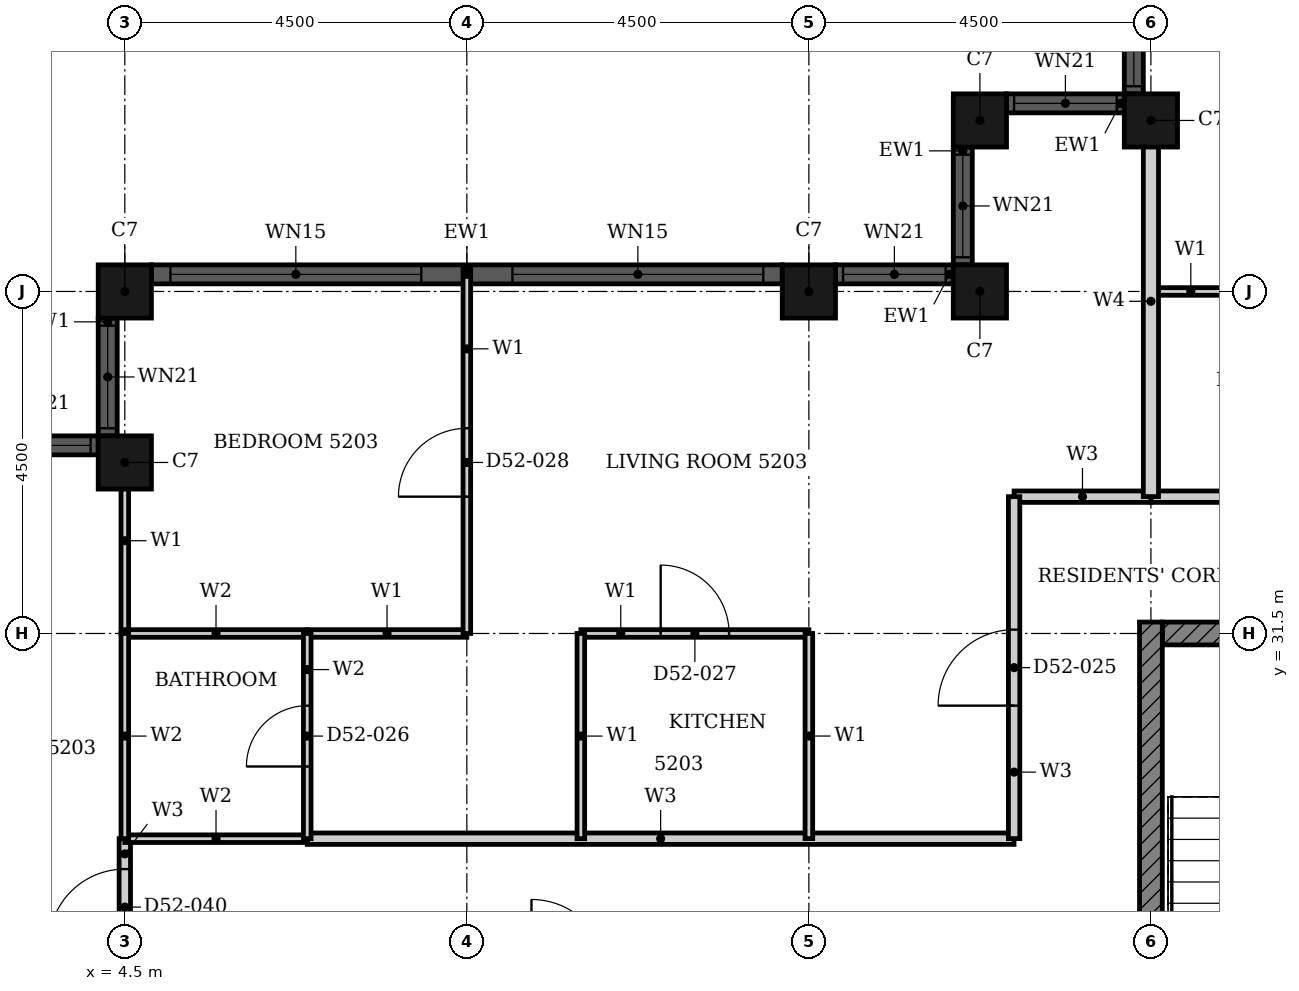
"""IFC4 building model, lengths in metres.
Left out: names, types, materials, properties, quantities, classifications, styles, units other than length and angle.
Written with IfcOpenShell. Run it as: python <this file> out.ifc"""

import sys

from ifc_helpers import new_model, si_unit, direction, frame, frame_2d, origin, origin_2d, place, context, subcontext, project, spatial, rectangle, hollow_rectangle, extrude, element, fill, save


model = new_model("IFC4")
c1 = context("Model", 3, precision=1e-05, world=origin(), true_north=direction((0.0, 1.0)))
c2 = subcontext(c1, "Body", "Model", "MODEL_VIEW")
j1 = project(units=[si_unit("LENGTHUNIT", "METRE"), si_unit("PLANEANGLEUNIT", "RADIAN")], contexts=[c1])
p1 = place(None, origin())
s1 = spatial("IfcSite", under=j1, at=p1, CompositionType="ELEMENT")
p2 = place(p1, origin())
s2 = spatial("IfcBuilding", under=s1, at=p2, CompositionType="ELEMENT")
p3 = place(p2, frame((0.0, 0.0, 207.2)))
s3 = spatial("IfcBuildingStorey", under=s2, at=p3, CompositionType="ELEMENT", Elevation=207.2)
for number, where, z_axis, x_axis in (
    (1, (18.0, 38.25, 0.0), (0.0, 0.0, 1.0), (1.0, 0.0, 0.0)),
    (2, (15.75, 38.25, 0.0), (0.0, 0.0, 1.0), (1.0, 0.0, 0.0)),
    (3, (15.75, 36.0, 0.0), (0.0, 0.0, 1.0), (1.0, 0.0, 0.0)),
    (4, (13.5, 36.0, 0.0), (0.0, 0.0, 1.0), (1.0, 0.0, 0.0)),
    (5, (4.5, 36.0, 0.0), (0.0, 0.0, 1.0), (1.0, 0.0, 0.0)),
    (6, (4.5, 33.75, 0.0), (0.0, 0.0, 1.0), (1.0, 0.0, 0.0)),
):
    element("IfcColumn", number, at=place(p3, frame(where, z_axis=z_axis, x_axis=x_axis)), inside=s3, PredefinedType="COLUMN", context=c2, shape_type="SweptSolid", body=[
        extrude(hollow_rectangle(XDim=0.7, YDim=0.7, WallThickness=0.022, at=origin_2d()), origin(), (0.0, 0.0, 1.0), 3.7),
    ])
p4 = place(p3, frame((17.775, 40.15, 0.0), z_axis=(0.0, 0.0, 1.0), x_axis=(0.0, -1.0, 0.0)))
e7 = element("IfcWall", 7, at=p4, inside=s3, PredefinedType="SOLIDWALL", context=c2, shape_type="SweptSolid", body=[
    extrude(rectangle(XDim=1.55, YDim=0.25, at=frame_2d((0.775, 0.0))), origin(), (0.0, 0.0, 1.0), 3.7),
])
p5 = place(p4, frame((0.1, 0.0, 0.9)))
e8 = element("IfcOpeningElement", 8, at=p5, cuts=e7, PredefinedType="OPENING", context=c2, shape_type="SweptSolid", body=[
    extrude(rectangle(XDim=1.35, YDim=1.85, at=frame_2d((0.675, 0.925))), frame((0.0, 0.135, 0.0), z_axis=(0.0, -1.0, 0.0), x_axis=(1.0, 0.0, 0.0)), (0.0, 0.0, 1.0), 0.27),
])
p6 = place(p3, frame((17.65, 38.475, 0.0), z_axis=(0.0, 0.0, 1.0), x_axis=(-1.0, 0.0, 0.0)))
e9 = element("IfcWall", 9, at=p6, inside=s3, PredefinedType="SOLIDWALL", context=c2, shape_type="SweptSolid", body=[
    extrude(rectangle(XDim=1.55, YDim=0.25, at=frame_2d((0.775, 0.0))), origin(), (0.0, 0.0, 1.0), 3.7),
])
p7 = place(p6, frame((0.1, 0.0, 0.9)))
e10 = element("IfcOpeningElement", 10, at=p7, cuts=e9, PredefinedType="OPENING", context=c2, shape_type="SweptSolid", body=[
    extrude(rectangle(XDim=1.35, YDim=1.85, at=frame_2d((0.675, 0.925))), frame((0.0, 0.135, 0.0), z_axis=(0.0, -1.0, 0.0), x_axis=(1.0, 0.0, 0.0)), (0.0, 0.0, 1.0), 0.27),
])
p8 = place(p3, frame((15.525, 37.9, 0.0), z_axis=(0.0, 0.0, 1.0), x_axis=(0.0, -1.0, 0.0)))
e11 = element("IfcWall", 11, at=p8, inside=s3, PredefinedType="SOLIDWALL", context=c2, shape_type="SweptSolid", body=[
    extrude(rectangle(XDim=1.55, YDim=0.25, at=frame_2d((0.775, 0.0))), origin(), (0.0, 0.0, 1.0), 3.7),
])
p9 = place(p8, frame((0.1, 0.0, 0.9)))
e12 = element("IfcOpeningElement", 12, at=p9, cuts=e11, PredefinedType="OPENING", context=c2, shape_type="SweptSolid", body=[
    extrude(rectangle(XDim=1.35, YDim=1.85, at=frame_2d((0.675, 0.925))), frame((0.0, 0.135, 0.0), z_axis=(0.0, -1.0, 0.0), x_axis=(1.0, 0.0, 0.0)), (0.0, 0.0, 1.0), 0.27),
])
p10 = place(p3, frame((15.4, 36.225, 0.0), z_axis=(0.0, 0.0, 1.0), x_axis=(-1.0, 0.0, 0.0)))
e13 = element("IfcWall", 13, at=p10, inside=s3, PredefinedType="SOLIDWALL", context=c2, shape_type="SweptSolid", body=[
    extrude(rectangle(XDim=1.55, YDim=0.25, at=frame_2d((0.775, 0.0))), origin(), (0.0, 0.0, 1.0), 3.7),
])
p11 = place(p10, frame((0.1, 0.0, 0.9)))
e14 = element("IfcOpeningElement", 14, at=p11, cuts=e13, PredefinedType="OPENING", context=c2, shape_type="SweptSolid", body=[
    extrude(rectangle(XDim=1.35, YDim=1.85, at=frame_2d((0.675, 0.925))), frame((0.0, 0.135, 0.0), z_axis=(0.0, -1.0, 0.0), x_axis=(1.0, 0.0, 0.0)), (0.0, 0.0, 1.0), 0.27),
])
p12 = place(p3, frame((13.15, 36.225, 0.0), z_axis=(0.0, 0.0, 1.0), x_axis=(-1.0, 0.0, 0.0)))
e15 = element("IfcWall", 15, at=p12, inside=s3, PredefinedType="SOLIDWALL", context=c2, shape_type="SweptSolid", body=[
    extrude(rectangle(XDim=8.3, YDim=0.25, at=frame_2d((4.15, 0.0))), origin(), (0.0, 0.0, 1.0), 3.7),
])
p13 = place(p12, frame((0.25, 0.0, 0.45)))
e16 = element("IfcOpeningElement", 16, at=p13, cuts=e15, PredefinedType="OPENING", context=c2, shape_type="SweptSolid", body=[
    extrude(rectangle(XDim=3.3, YDim=2.3, at=frame_2d((1.65, 1.15))), frame((0.0, 0.135, 0.0), z_axis=(0.0, -1.0, 0.0), x_axis=(1.0, 0.0, 0.0)), (0.0, 0.0, 1.0), 0.27),
])
p14 = place(p12, frame((4.75, 0.0, 0.45)))
e17 = element("IfcOpeningElement", 17, at=p14, cuts=e15, PredefinedType="OPENING", context=c2, shape_type="SweptSolid", body=[
    extrude(rectangle(XDim=3.3, YDim=2.3, at=frame_2d((1.65, 1.15))), frame((0.0, 0.135, 0.0), z_axis=(0.0, -1.0, 0.0), x_axis=(1.0, 0.0, 0.0)), (0.0, 0.0, 1.0), 0.27),
])
p15 = place(p3, frame((4.275, 35.65, 0.0), z_axis=(0.0, 0.0, 1.0), x_axis=(0.0, -1.0, 0.0)))
e18 = element("IfcWall", 18, at=p15, inside=s3, PredefinedType="SOLIDWALL", context=c2, shape_type="SweptSolid", body=[
    extrude(rectangle(XDim=1.55, YDim=0.25, at=frame_2d((0.775, 0.0))), origin(), (0.0, 0.0, 1.0), 3.7),
])
p16 = place(p15, frame((0.1, 0.0, 0.9)))
e19 = element("IfcOpeningElement", 19, at=p16, cuts=e18, PredefinedType="OPENING", context=c2, shape_type="SweptSolid", body=[
    extrude(rectangle(XDim=1.35, YDim=1.85, at=frame_2d((0.675, 0.925))), frame((0.0, 0.135, 0.0), z_axis=(0.0, -1.0, 0.0), x_axis=(1.0, 0.0, 0.0)), (0.0, 0.0, 1.0), 0.27),
])
p17 = place(p3, frame((4.15, 33.975, 0.0), z_axis=(0.0, 0.0, 1.0), x_axis=(-1.0, 0.0, 0.0)))
e20 = element("IfcWall", 20, at=p17, inside=s3, PredefinedType="SOLIDWALL", context=c2, shape_type="SweptSolid", body=[
    extrude(rectangle(XDim=1.55, YDim=0.25, at=frame_2d((0.775, 0.0))), origin(), (0.0, 0.0, 1.0), 3.7),
])
p18 = place(p17, frame((0.1, 0.0, 0.9)))
e21 = element("IfcOpeningElement", 21, at=p18, cuts=e20, PredefinedType="OPENING", context=c2, shape_type="SweptSolid", body=[
    extrude(rectangle(XDim=1.35, YDim=1.85, at=frame_2d((0.675, 0.925))), frame((0.0, 0.135, 0.0), z_axis=(0.0, -1.0, 0.0), x_axis=(1.0, 0.0, 0.0)), (0.0, 0.0, 1.0), 0.27),
])
p19 = place(p3, frame((18.15, 31.5, 0.0), z_axis=(0.0, 0.0, 1.0), x_axis=(1.0, 0.0, 0.0)))
e22 = element("IfcWall", 22, at=p19, inside=s3, PredefinedType="SHEAR", context=c2, shape_type="SweptSolid", body=[
    extrude(rectangle(XDim=9.368, YDim=0.3, at=frame_2d((4.684, 0.0))), origin(), (0.0, 0.0, 1.0), 3.4),
])
p20 = place(p19, frame((4.736, 0.0, 0.0)))
e23 = element("IfcOpeningElement", 23, at=p20, cuts=e22, PredefinedType="OPENING", context=c2, shape_type="SweptSolid", body=[
    extrude(rectangle(XDim=1.8, YDim=2.1, at=frame_2d((0.9, 1.05))), frame((0.0, 0.16, 0.0), z_axis=(0.0, -1.0, 0.0), x_axis=(1.0, 0.0, 0.0)), (0.0, 0.0, 1.0), 0.32),
])
p21 = place(p3, frame((18.0, 22.35, 0.0), z_axis=(0.0, 0.0, 1.0), x_axis=(0.0, 1.0, 0.0)))
e24 = element("IfcWall", 24, at=p21, inside=s3, PredefinedType="SHEAR", context=c2, shape_type="SweptSolid", body=[
    extrude(rectangle(XDim=9.3, YDim=0.3, at=frame_2d((4.65, 0.0))), origin(), (0.0, 0.0, 1.0), 3.4),
])
p22 = place(p3, frame((6.9, 28.8, 0.0), z_axis=(0.0, 0.0, 1.0), x_axis=(1.0, 0.0, 0.0)))
e25 = element("IfcWall", 25, at=p22, inside=s3, PredefinedType="PARTITIONING", context=c2, shape_type="SweptSolid", body=[
    extrude(rectangle(XDim=9.299, YDim=0.15, at=frame_2d((4.649, 0.0))), origin(), (0.0, 0.0, 1.0), 3.4),
])
p23 = place(p3, frame((18.0, 33.3, 0.0), z_axis=(0.0, 0.0, 1.0), x_axis=(1.0, 0.0, 0.0)))
e26 = element("IfcWall", 26, at=p23, inside=s3, PredefinedType="PARTITIONING", context=c2, shape_type="SweptSolid", body=[
    extrude(rectangle(XDim=6.6, YDim=0.15, at=frame_2d((3.3, 0.0))), origin(), (0.0, 0.0, 1.0), 3.4),
])
p24 = place(p23, frame((4.3, 0.0, 0.0)))
e27 = element("IfcOpeningElement", 27, at=p24, cuts=e26, PredefinedType="OPENING", context=c2, shape_type="SweptSolid", body=[
    extrude(rectangle(XDim=1.0, YDim=2.2, at=frame_2d((0.5, 1.1))), frame((0.0, 0.085, 0.0), z_axis=(0.0, -1.0, 0.0), x_axis=(1.0, 0.0, 0.0)), (0.0, 0.0, 1.0), 0.17),
])
p25 = place(p3, frame((16.2, 33.3, 0.0), z_axis=(0.0, 0.0, 1.0), x_axis=(1.0, 0.0, 0.0)))
e28 = element("IfcWall", 28, at=p25, inside=s3, PredefinedType="PARTITIONING", context=c2, shape_type="SweptSolid", body=[
    extrude(rectangle(XDim=1.799, YDim=0.15, at=frame_2d((0.899, 0.0))), origin(), (0.0, 0.0, 1.0), 3.4),
])
p26 = place(p3, frame((16.2, 28.801, 0.0), z_axis=(0.0, 0.0, 1.0), x_axis=(0.0, 1.0, 0.0)))
e29 = element("IfcWall", 29, at=p26, inside=s3, PredefinedType="PARTITIONING", context=c2, shape_type="SweptSolid", body=[
    extrude(rectangle(XDim=4.499, YDim=0.15, at=frame_2d((2.25, 0.0))), origin(), (0.0, 0.0, 1.0), 3.4),
])
p27 = place(p26, frame((1.75, 0.0, 0.0)))
e30 = element("IfcOpeningElement", 30, at=p27, cuts=e29, PredefinedType="OPENING", context=c2, shape_type="SweptSolid", body=[
    extrude(rectangle(XDim=1.0, YDim=2.2, at=frame_2d((0.5, 1.1))), frame((0.0, 0.085, 0.0), z_axis=(0.0, -1.0, 0.0), x_axis=(1.0, 0.0, 0.0)), (0.0, 0.0, 1.0), 0.17),
])
p28 = place(p3, frame((4.5, 27.0, 0.0), z_axis=(0.0, 0.0, 1.0), x_axis=(0.0, 1.0, 0.0)))
e31 = element("IfcWall", 31, at=p28, inside=s3, PredefinedType="PARTITIONING", context=c2, shape_type="SweptSolid", body=[
    extrude(rectangle(XDim=1.8, YDim=0.15, at=frame_2d((0.9, 0.0))), origin(), (0.0, 0.0, 1.0), 3.4),
])
p29 = place(p28, frame((0.4, 0.0, 0.0)))
e32 = element("IfcOpeningElement", 32, at=p29, cuts=e31, PredefinedType="OPENING", context=c2, shape_type="SweptSolid", body=[
    extrude(rectangle(XDim=1.0, YDim=2.1, at=frame_2d((0.5, 1.05))), frame((0.0, 0.085, 0.0), z_axis=(0.0, -1.0, 0.0), x_axis=(1.0, 0.0, 0.0)), (0.0, 0.0, 1.0), 0.17),
])
p30 = place(p3, frame((6.9, 31.5, 0.0), z_axis=(0.0, 0.0, 1.0), x_axis=(1.0, 0.0, 0.0)))
e33 = element("IfcWall", 33, at=p30, inside=s3, PredefinedType="PARTITIONING", context=c2, shape_type="SweptSolid", body=[
    extrude(rectangle(XDim=2.1, YDim=0.1, at=frame_2d((1.05, 0.0))), origin(), (0.0, 0.0, 1.0), 2.68),
])
p31 = place(p3, frame((10.5, 31.5, 0.0), z_axis=(0.0, 0.0, 1.0), x_axis=(1.0, 0.0, 0.0)))
e34 = element("IfcWall", 34, at=p31, inside=s3, PredefinedType="PARTITIONING", context=c2, shape_type="SweptSolid", body=[
    extrude(rectangle(XDim=3.0, YDim=0.1, at=frame_2d((1.5, 0.0))), origin(), (0.0, 0.0, 1.0), 2.68),
])
p32 = place(p31, frame((1.05, 0.0, 0.0)))
e35 = element("IfcOpeningElement", 35, at=p32, cuts=e34, PredefinedType="OPENING", context=c2, shape_type="SweptSolid", body=[
    extrude(rectangle(XDim=0.9, YDim=2.1, at=frame_2d((0.45, 1.05))), frame((0.0, 0.06, 0.0), z_axis=(0.0, -1.0, 0.0), x_axis=(1.0, 0.0, 0.0)), (0.0, 0.0, 1.0), 0.12),
])
p33 = place(p3, frame((18.0, 36.0, 0.0), z_axis=(0.0, 0.0, 1.0), x_axis=(1.0, 0.0, 0.0)))
e36 = element("IfcWall", 36, at=p33, inside=s3, PredefinedType="PARTITIONING", context=c2, shape_type="SweptSolid", body=[
    extrude(rectangle(XDim=3.0, YDim=0.1, at=frame_2d((1.5, 0.0))), origin(), (0.0, 0.0, 1.0), 3.4),
])
p34 = place(p33, frame((1.05, 0.0, 0.0)))
e37 = element("IfcOpeningElement", 37, at=p34, cuts=e36, PredefinedType="OPENING", context=c2, shape_type="SweptSolid", body=[
    extrude(rectangle(XDim=0.9, YDim=2.1, at=frame_2d((0.45, 1.05))), frame((0.0, 0.06, 0.0), z_axis=(0.0, -1.0, 0.0), x_axis=(1.0, 0.0, 0.0)), (0.0, 0.0, 1.0), 0.12),
])
p35 = place(p3, frame((10.5, 28.8, 0.0), z_axis=(0.0, 0.0, 1.0), x_axis=(0.0, 1.0, 0.0)))
e38 = element("IfcWall", 38, at=p35, inside=s3, PredefinedType="PARTITIONING", context=c2, shape_type="SweptSolid", body=[
    extrude(rectangle(XDim=2.7, YDim=0.1, at=frame_2d((1.35, 0.0))), origin(), (0.0, 0.0, 1.0), 3.4),
])
p36 = place(p3, frame((13.5, 28.801, 0.0), z_axis=(0.0, 0.0, 1.0), x_axis=(0.0, 1.0, 0.0)))
e39 = element("IfcWall", 39, at=p36, inside=s3, PredefinedType="PARTITIONING", context=c2, shape_type="SweptSolid", body=[
    extrude(rectangle(XDim=2.699, YDim=0.1, at=frame_2d((1.35, 0.0))), origin(), (0.0, 0.0, 1.0), 2.48),
])
p37 = place(p3, frame((4.5, 31.501, 0.0), z_axis=(0.0, 0.0, 1.0), x_axis=(0.0, 1.0, 0.0)))
e40 = element("IfcWall", 40, at=p37, inside=s3, PredefinedType="PARTITIONING", context=c2, shape_type="SweptSolid", body=[
    extrude(rectangle(XDim=2.439, YDim=0.1, at=frame_2d((1.219, 0.0))), origin(), (0.0, 0.0, 1.0), 3.4),
])
p38 = place(p3, frame((9.0, 31.5, 0.0), z_axis=(0.0, 0.0, 1.0), x_axis=(0.0, 1.0, 0.0)))
e41 = element("IfcWall", 41, at=p38, inside=s3, PredefinedType="PARTITIONING", context=c2, shape_type="SweptSolid", body=[
    extrude(rectangle(XDim=4.79, YDim=0.1, at=frame_2d((2.395, 0.0))), origin(), (0.0, 0.0, 1.0), 3.4),
])
p39 = place(p38, frame((1.8, 0.0, 0.0)))
e42 = element("IfcOpeningElement", 42, at=p39, cuts=e41, PredefinedType="OPENING", context=c2, shape_type="SweptSolid", body=[
    extrude(rectangle(XDim=0.9, YDim=2.1, at=frame_2d((0.45, 1.05))), frame((0.0, 0.06, 0.0), z_axis=(0.0, -1.0, 0.0), x_axis=(1.0, 0.0, 0.0)), (0.0, 0.0, 1.0), 0.12),
])
p40 = place(p3, frame((18.0, 33.301, 0.0), z_axis=(0.0, 0.0, 1.0), x_axis=(0.0, 1.0, 0.0)))
e43 = element("IfcWall", 43, at=p40, inside=s3, PredefinedType="PARTITIONING", context=c2, shape_type="SweptSolid", body=[
    extrude(rectangle(XDim=5.139, YDim=0.2, at=frame_2d((2.569, 0.0))), origin(), (0.0, 0.0, 1.0), 3.4),
])
p41 = place(p3, frame((4.5, 28.8, 0.0), z_axis=(0.0, 0.0, 1.0), x_axis=(1.0, 0.0, 0.0)))
e44 = element("IfcWall", 44, at=p41, inside=s3, PredefinedType="PARTITIONING", context=c2, shape_type="SweptSolid", body=[
    extrude(rectangle(XDim=2.4, YDim=0.1, at=frame_2d((1.2, 0.0))), origin(), (0.0, 0.0, 1.0), 3.4),
])
p42 = place(p3, frame((4.5, 31.5, 0.0), z_axis=(0.0, 0.0, 1.0), x_axis=(1.0, 0.0, 0.0)))
e45 = element("IfcWall", 45, at=p42, inside=s3, PredefinedType="PARTITIONING", context=c2, shape_type="SweptSolid", body=[
    extrude(rectangle(XDim=2.4, YDim=0.1, at=frame_2d((1.2, 0.0))), origin(), (0.0, 0.0, 1.0), 2.68),
])
p43 = place(p3, frame((4.5, 28.8, 0.0), z_axis=(0.0, 0.0, 1.0), x_axis=(0.0, 1.0, 0.0)))
e46 = element("IfcWall", 46, at=p43, inside=s3, PredefinedType="PARTITIONING", context=c2, shape_type="SweptSolid", body=[
    extrude(rectangle(XDim=2.7, YDim=0.1, at=frame_2d((1.35, 0.0))), origin(), (0.0, 0.0, 1.0), 3.4),
])
p44 = place(p3, frame((6.9, 28.8, 0.0), z_axis=(0.0, 0.0, 1.0), x_axis=(0.0, 1.0, 0.0)))
e47 = element("IfcWall", 47, at=p44, inside=s3, PredefinedType="PARTITIONING", context=c2, shape_type="SweptSolid", body=[
    extrude(rectangle(XDim=2.7, YDim=0.1, at=frame_2d((1.35, 0.0))), origin(), (0.0, 0.0, 1.0), 3.4),
])
p45 = place(p44, frame((0.95, 0.0, 0.0)))
e48 = element("IfcOpeningElement", 48, at=p45, cuts=e47, PredefinedType="OPENING", context=c2, shape_type="SweptSolid", body=[
    extrude(rectangle(XDim=0.8, YDim=2.1, at=frame_2d((0.4, 1.05))), frame((0.0, 0.06, 0.0), z_axis=(0.0, -1.0, 0.0), x_axis=(1.0, 0.0, 0.0)), (0.0, 0.0, 1.0), 0.12),
])
p46 = place(p5, origin())
e49 = element("IfcWindow", 49, at=p46, inside=s3, PartitioningType="SINGLE_PANEL", PredefinedType="WINDOW", context=c2, shape_type="SweptSolid", body=[
    extrude(rectangle(XDim=1.35, YDim=1.85, at=frame_2d((0.675, 0.925))), frame((0.0, 0.03, 0.0), z_axis=(0.0, -1.0, 0.0), x_axis=(1.0, 0.0, 0.0)), (0.0, 0.0, 1.0), 0.06),
])
fill(e8, e49)
p47 = place(p7, origin())
e50 = element("IfcWindow", 50, at=p47, inside=s3, PartitioningType="SINGLE_PANEL", PredefinedType="WINDOW", context=c2, shape_type="SweptSolid", body=[
    extrude(rectangle(XDim=1.35, YDim=1.85, at=frame_2d((0.675, 0.925))), frame((0.0, 0.03, 0.0), z_axis=(0.0, -1.0, 0.0), x_axis=(1.0, 0.0, 0.0)), (0.0, 0.0, 1.0), 0.06),
])
fill(e10, e50)
p48 = place(p9, origin())
e51 = element("IfcWindow", 51, at=p48, inside=s3, PartitioningType="SINGLE_PANEL", PredefinedType="WINDOW", context=c2, shape_type="SweptSolid", body=[
    extrude(rectangle(XDim=1.35, YDim=1.85, at=frame_2d((0.675, 0.925))), frame((0.0, 0.03, 0.0), z_axis=(0.0, -1.0, 0.0), x_axis=(1.0, 0.0, 0.0)), (0.0, 0.0, 1.0), 0.06),
])
fill(e12, e51)
p49 = place(p11, origin())
e52 = element("IfcWindow", 52, at=p49, inside=s3, PartitioningType="SINGLE_PANEL", PredefinedType="WINDOW", context=c2, shape_type="SweptSolid", body=[
    extrude(rectangle(XDim=1.35, YDim=1.85, at=frame_2d((0.675, 0.925))), frame((0.0, 0.03, 0.0), z_axis=(0.0, -1.0, 0.0), x_axis=(1.0, 0.0, 0.0)), (0.0, 0.0, 1.0), 0.06),
])
fill(e14, e52)
p50 = place(p13, origin())
e53 = element("IfcWindow", 53, at=p50, inside=s3, PartitioningType="SINGLE_PANEL", PredefinedType="WINDOW", context=c2, shape_type="SweptSolid", body=[
    extrude(rectangle(XDim=3.3, YDim=2.3, at=frame_2d((1.65, 1.15))), frame((0.0, 0.03, 0.0), z_axis=(0.0, -1.0, 0.0), x_axis=(1.0, 0.0, 0.0)), (0.0, 0.0, 1.0), 0.06),
])
fill(e16, e53)
p51 = place(p14, origin())
e54 = element("IfcWindow", 54, at=p51, inside=s3, PartitioningType="SINGLE_PANEL", PredefinedType="WINDOW", context=c2, shape_type="SweptSolid", body=[
    extrude(rectangle(XDim=3.3, YDim=2.3, at=frame_2d((1.65, 1.15))), frame((0.0, 0.03, 0.0), z_axis=(0.0, -1.0, 0.0), x_axis=(1.0, 0.0, 0.0)), (0.0, 0.0, 1.0), 0.06),
])
fill(e17, e54)
p52 = place(p16, origin())
e55 = element("IfcWindow", 55, at=p52, inside=s3, PartitioningType="SINGLE_PANEL", PredefinedType="WINDOW", context=c2, shape_type="SweptSolid", body=[
    extrude(rectangle(XDim=1.35, YDim=1.85, at=frame_2d((0.675, 0.925))), frame((0.0, 0.03, 0.0), z_axis=(0.0, -1.0, 0.0), x_axis=(1.0, 0.0, 0.0)), (0.0, 0.0, 1.0), 0.06),
])
fill(e19, e55)
p53 = place(p18, origin())
e56 = element("IfcWindow", 56, at=p53, inside=s3, PartitioningType="SINGLE_PANEL", PredefinedType="WINDOW", context=c2, shape_type="SweptSolid", body=[
    extrude(rectangle(XDim=1.35, YDim=1.85, at=frame_2d((0.675, 0.925))), frame((0.0, 0.03, 0.0), z_axis=(0.0, -1.0, 0.0), x_axis=(1.0, 0.0, 0.0)), (0.0, 0.0, 1.0), 0.06),
])
fill(e21, e56)
p54 = place(p27, origin())
e57 = element("IfcDoor", 57, at=p54, inside=s3, OperationType="SINGLE_SWING_LEFT", PredefinedType="DOOR", context=c2, shape_type="SweptSolid", body=[
    extrude(rectangle(XDim=1.0, YDim=2.2, at=frame_2d((0.5, 1.1))), frame((0.0, 0.025, 0.0), z_axis=(0.0, -1.0, 0.0), x_axis=(1.0, 0.0, 0.0)), (0.0, 0.0, 1.0), 0.05),
])
fill(e30, e57)
p55 = place(p45, origin())
e58 = element("IfcDoor", 58, at=p55, inside=s3, OperationType="SINGLE_SWING_RIGHT", PredefinedType="DOOR", context=c2, shape_type="SweptSolid", body=[
    extrude(rectangle(XDim=0.8, YDim=2.1, at=frame_2d((0.4, 1.05))), frame((0.0, 0.025, 0.0), z_axis=(0.0, -1.0, 0.0), x_axis=(1.0, 0.0, 0.0)), (0.0, 0.0, 1.0), 0.05),
])
fill(e48, e58)
p56 = place(p32, origin())
e59 = element("IfcDoor", 59, at=p56, inside=s3, OperationType="SINGLE_SWING_RIGHT", PredefinedType="DOOR", context=c2, shape_type="SweptSolid", body=[
    extrude(rectangle(XDim=0.9, YDim=2.1, at=frame_2d((0.45, 1.05))), frame((0.0, 0.025, 0.0), z_axis=(0.0, -1.0, 0.0), x_axis=(1.0, 0.0, 0.0)), (0.0, 0.0, 1.0), 0.05),
])
fill(e35, e59)
p57 = place(p39, origin())
e60 = element("IfcDoor", 60, at=p57, inside=s3, OperationType="SINGLE_SWING_LEFT", PredefinedType="DOOR", context=c2, shape_type="SweptSolid", body=[
    extrude(rectangle(XDim=0.9, YDim=2.1, at=frame_2d((0.45, 1.05))), frame((0.0, 0.025, 0.0), z_axis=(0.0, -1.0, 0.0), x_axis=(1.0, 0.0, 0.0)), (0.0, 0.0, 1.0), 0.05),
])
fill(e42, e60)
p58 = place(p29, origin())
e61 = element("IfcDoor", 61, at=p58, inside=s3, OperationType="SINGLE_SWING_RIGHT", PredefinedType="DOOR", context=c2, shape_type="SweptSolid", body=[
    extrude(rectangle(XDim=1.0, YDim=2.1, at=frame_2d((0.5, 1.05))), frame((0.0, 0.025, 0.0), z_axis=(0.0, -1.0, 0.0), x_axis=(1.0, 0.0, 0.0)), (0.0, 0.0, 1.0), 0.05),
])
fill(e32, e61)
save(model, sys.argv[1])
